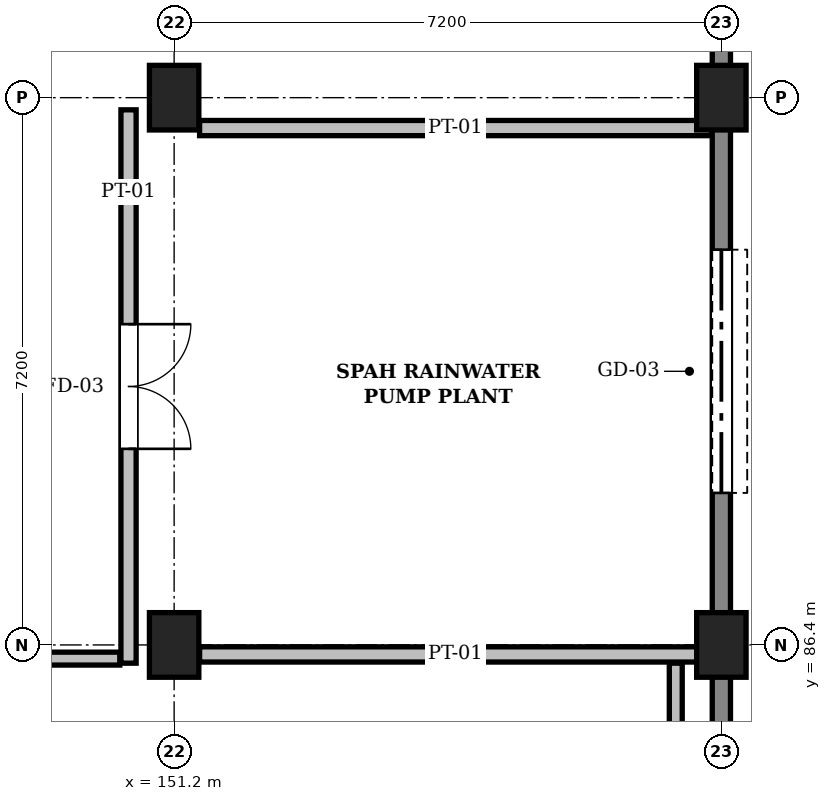
"""IFC4 building model, lengths in metres.
Left out: names, types, materials, properties, quantities, classifications, styles, units other than length and angle.
Written with IfcOpenShell. Run it as: python <this file> out.ifc"""

import sys

from ifc_helpers import new_model, si_unit, direction, frame, frame_2d, origin, origin_2d, place, context, subcontext, project, spatial, rectangle, extrude, element, fill, save


model = new_model("IFC4")
c1 = context("Model", 3, precision=1e-05, world=origin(), true_north=direction((0.0, 1.0)))
c2 = subcontext(c1, "Body", "Model", "MODEL_VIEW")
j1 = project(units=[si_unit("LENGTHUNIT", "METRE"), si_unit("PLANEANGLEUNIT", "RADIAN")], contexts=[c1])
p1 = place(None, origin())
s1 = spatial("IfcSite", under=j1, at=p1, CompositionType="ELEMENT")
p2 = place(p1, origin())
s2 = spatial("IfcBuilding", under=s1, at=p2, CompositionType="ELEMENT")
p3 = place(p2, origin())
s3 = spatial("IfcBuildingStorey", under=s2, at=p3, CompositionType="ELEMENT", Elevation=0.0)
for number, where, z_axis, x_axis in (
    (1, (151.2, 86.4, 0.0), (0.0, 0.0, 1.0), (1.0, 0.0, 0.0)),
    (2, (151.2, 93.6, 0.0), (0.0, 0.0, 1.0), (1.0, 0.0, 0.0)),
    (3, (158.4, 86.4, 0.0), (0.0, 0.0, 1.0), (1.0, 0.0, 0.0)),
    (4, (158.4, 93.6, 0.0), (0.0, 0.0, 1.0), (1.0, 0.0, 0.0)),
):
    element("IfcColumn", number, at=place(p3, frame(where, z_axis=z_axis, x_axis=x_axis)), inside=s3, PredefinedType="COLUMN", context=c2, shape_type="SweptSolid", body=[
        extrude(rectangle(XDim=0.65, YDim=0.85, at=origin_2d()), origin(), (0.0, 0.0, 1.0), 4.8),
    ])
p4 = place(p3, frame((158.4, 100.8, 0.0), z_axis=(0.0, 0.0, 1.0), x_axis=(0.0, -1.0, 0.0)))
e5 = element("IfcWall", 5, at=p4, inside=s3, PredefinedType="SOLIDWALL", context=c2, shape_type="SweptSolid", body=[
    extrude(rectangle(XDim=7.2, YDim=0.24, at=frame_2d((3.6, 0.0))), origin(), (0.0, 0.0, 1.0), 4.52),
])
p5 = place(p4, frame((1.6, 0.0, 0.0)))
e6 = element("IfcOpeningElement", 6, at=p5, cuts=e5, PredefinedType="OPENING", context=c2, shape_type="SweptSolid", body=[
    extrude(rectangle(XDim=4.0, YDim=3.55, at=frame_2d((2.0, 1.775))), frame((0.0, 0.132, 0.0), z_axis=(0.0, -1.0, 0.0), x_axis=(1.0, 0.0, 0.0)), (0.0, 0.0, 1.0), 0.264),
])
p6 = place(p3, frame((158.4, 93.6, 0.0), z_axis=(0.0, 0.0, 1.0), x_axis=(0.0, -1.0, 0.0)))
e7 = element("IfcWall", 7, at=p6, inside=s3, PredefinedType="SOLIDWALL", context=c2, shape_type="SweptSolid", body=[
    extrude(rectangle(XDim=7.2, YDim=0.24, at=frame_2d((3.6, 0.0))), origin(), (0.0, 0.0, 1.0), 4.52),
])
p7 = place(p6, frame((2.0, 0.0, 0.0)))
e8 = element("IfcOpeningElement", 8, at=p7, cuts=e7, PredefinedType="OPENING", context=c2, shape_type="SweptSolid", body=[
    extrude(rectangle(XDim=3.2, YDim=3.5, at=frame_2d((1.6, 1.75))), frame((0.0, 0.132, 0.0), z_axis=(0.0, -1.0, 0.0), x_axis=(1.0, 0.0, 0.0)), (0.0, 0.0, 1.0), 0.264),
])
p8 = place(p3, frame((158.4, 86.4, 0.0), z_axis=(0.0, 0.0, 1.0), x_axis=(0.0, -1.0, 0.0)))
e9 = element("IfcWall", 9, at=p8, inside=s3, PredefinedType="SOLIDWALL", context=c2, shape_type="SweptSolid", body=[
    extrude(rectangle(XDim=7.048, YDim=0.24, at=frame_2d((3.524, 0.0))), origin(), (0.0, 0.0, 1.0), 4.52),
])
p9 = place(p8, frame((1.29, 0.0, 0.95)))
e10 = element("IfcOpeningElement", 10, at=p9, cuts=e9, PredefinedType="OPENING", context=c2, shape_type="SweptSolid", body=[
    extrude(rectangle(XDim=1.1, YDim=1.55, at=frame_2d((0.55, 0.775))), frame((0.0, 0.132, 0.0), z_axis=(0.0, -1.0, 0.0), x_axis=(1.0, 0.0, 0.0)), (0.0, 0.0, 1.0), 0.264),
])
for number, where, z_axis, x_axis in (
    (11, (151.535, 86.275, 0.0), (0.0, 0.0, 1.0), (1.0, 0.0, 0.0)),
    (12, (151.535, 93.2, 0.0), (0.0, 0.0, 1.0), (1.0, 0.0, 0.0)),
):
    element("IfcWall", number, at=place(p3, frame(where, z_axis=z_axis, x_axis=x_axis)), inside=s3, PredefinedType="PARTITIONING", context=c2, shape_type="SweptSolid", body=[
        extrude(rectangle(XDim=6.733, YDim=0.2, at=frame_2d((3.367, 0.0))), origin(), (0.0, 0.0, 1.0), 3.8),
    ])
p10 = place(p3, frame((150.6, 86.16, 0.0), z_axis=(0.0, 0.0, 1.0), x_axis=(0.0, 1.0, 0.0)))
e13 = element("IfcWall", 13, at=p10, inside=s3, PredefinedType="PARTITIONING", context=c2, shape_type="SweptSolid", body=[
    extrude(rectangle(XDim=7.28, YDim=0.2, at=frame_2d((3.64, 0.0))), origin(), (0.0, 0.0, 1.0), 4.46),
])
p11 = place(p10, frame((2.82, 0.0, 0.0)))
e14 = element("IfcOpeningElement", 14, at=p11, cuts=e13, PredefinedType="OPENING", context=c2, shape_type="SweptSolid", body=[
    extrude(rectangle(XDim=1.64, YDim=2.24, at=frame_2d((0.82, 1.12))), frame((0.0, 0.112, 0.0), z_axis=(0.0, -1.0, 0.0), x_axis=(1.0, 0.0, 0.0)), (0.0, 0.0, 1.0), 0.224),
])
p12 = place(p3, frame((148.16, 86.22, 0.0), z_axis=(0.0, 0.0, 1.0), x_axis=(1.0, 0.0, 0.0)))
e15 = element("IfcWall", 15, at=p12, inside=s3, PredefinedType="PARTITIONING", context=c2, shape_type="SweptSolid", body=[
    extrude(rectangle(XDim=2.325, YDim=0.17, at=frame_2d((1.163, 0.0))), origin(), (0.0, 0.0, 1.0), 3.8),
])
p13 = place(p3, frame((157.8, 82.9, 0.0), z_axis=(0.0, 0.0, 1.0), x_axis=(0.0, 1.0, 0.0)))
e16 = element("IfcWall", 16, at=p13, inside=s3, PredefinedType="PARTITIONING", context=c2, shape_type="SweptSolid", body=[
    extrude(rectangle(XDim=3.26, YDim=0.17, at=frame_2d((1.63, 0.0))), origin(), (0.0, 0.0, 1.0), 4.46),
])
p14 = place(p7, origin())
e17 = element("IfcDoor", 17, at=p14, inside=s3, OperationType="ROLLINGUP", PredefinedType="GATE", context=c2, shape_type="SweptSolid", body=[
    extrude(rectangle(XDim=3.2, YDim=3.5, at=frame_2d((1.6, 1.75))), frame((0.0, 0.025, 0.0), z_axis=(0.0, -1.0, 0.0), x_axis=(1.0, 0.0, 0.0)), (0.0, 0.0, 1.0), 0.05),
])
fill(e8, e17)
p15 = place(p11, frame((1.64, 0.0, 0.0), z_axis=(0.0, 0.0, 1.0), x_axis=(-1.0, 0.0, 0.0)))
e18 = element("IfcDoor", 18, at=p15, inside=s3, OperationType="DOUBLE_DOOR_SINGLE_SWING", PredefinedType="DOOR", context=c2, shape_type="SweptSolid", body=[
    extrude(rectangle(XDim=1.64, YDim=2.24, at=frame_2d((0.82, 1.12))), frame((0.0, 0.025, 0.0), z_axis=(0.0, -1.0, 0.0), x_axis=(1.0, 0.0, 0.0)), (0.0, 0.0, 1.0), 0.05),
])
fill(e14, e18)
save(model, sys.argv[1])
